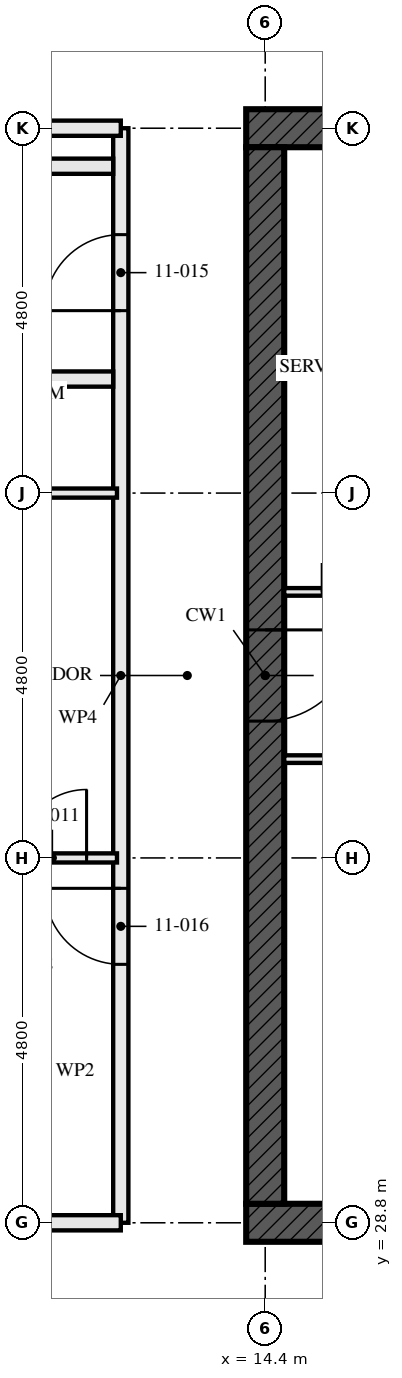
"""IFC4 building model, lengths in metres.
Left out: names, types, materials, properties, quantities, classifications, styles, units other than length and angle.
Written with IfcOpenShell. Run it as: python <this file> out.ifc"""

import sys

from ifc_helpers import new_model, si_unit, direction, frame, frame_2d, origin, place, context, subcontext, project, spatial, rectangle, extrude, element, fill, save


model = new_model("IFC4")
c1 = context("Model", 3, precision=1e-05, world=origin(), true_north=direction((0.0, 1.0)))
c2 = subcontext(c1, "Body", "Model", "MODEL_VIEW")
j1 = project(units=[si_unit("LENGTHUNIT", "METRE"), si_unit("PLANEANGLEUNIT", "RADIAN")], contexts=[c1])
p1 = place(None, origin())
s1 = spatial("IfcSite", under=j1, at=p1, CompositionType="ELEMENT")
p2 = place(p1, origin())
s2 = spatial("IfcBuilding", under=s1, at=p2, CompositionType="ELEMENT")
p3 = place(p2, frame((0.0, 0.0, 44.5)))
s3 = spatial("IfcBuildingStorey", under=s2, at=p3, CompositionType="ELEMENT", Elevation=44.5)
p4 = place(p3, frame((14.15, 28.8, -0.17), z_axis=(0.0, 0.0, 1.0), x_axis=(1.0, 0.0, 0.0)))
e1 = element("IfcWall", 1, at=p4, inside=s3, PredefinedType="SHEAR", context=c2, shape_type="SweptSolid", body=[
    extrude(rectangle(XDim=14.9, YDim=0.5, at=frame_2d((7.45, 0.0))), origin(), (0.0, 0.0, 1.0), 3.5),
])
p5 = place(p4, frame((6.85, 0.0, 0.17)))
e2 = element("IfcOpeningElement", 2, at=p5, cuts=e1, PredefinedType="OPENING", context=c2, shape_type="SweptSolid", body=[
    extrude(rectangle(XDim=1.2, YDim=2.1, at=frame_2d((0.6, 1.05))), frame((0.0, 0.26, 0.0), z_axis=(0.0, -1.0, 0.0), x_axis=(1.0, 0.0, 0.0)), (0.0, 0.0, 1.0), 0.521),
])
p6 = place(p3, frame((29.05, 43.2, -0.17), z_axis=(0.0, 0.0, 1.0), x_axis=(-1.0, 0.0, 0.0)))
e3 = element("IfcWall", 3, at=p6, inside=s3, PredefinedType="SHEAR", context=c2, shape_type="SweptSolid", body=[
    extrude(rectangle(XDim=14.9, YDim=0.5, at=frame_2d((7.45, 0.0))), origin(), (0.0, 0.0, 1.0), 3.5),
])
p7 = place(p6, frame((6.85, 0.0, 0.17)))
e4 = element("IfcOpeningElement", 4, at=p7, cuts=e3, PredefinedType="OPENING", context=c2, shape_type="SweptSolid", body=[
    extrude(rectangle(XDim=1.2, YDim=2.1, at=frame_2d((0.6, 1.05))), frame((0.0, 0.26, 0.0), z_axis=(0.0, -1.0, 0.0), x_axis=(1.0, 0.0, 0.0)), (0.0, 0.0, 1.0), 0.521),
])
p8 = place(p3, frame((14.4, 42.95, -0.17), z_axis=(0.0, 0.0, 1.0), x_axis=(0.0, -1.0, 0.0)))
e5 = element("IfcWall", 5, at=p8, inside=s3, PredefinedType="SHEAR", context=c2, shape_type="SweptSolid", body=[
    extrude(rectangle(XDim=13.9, YDim=0.5, at=frame_2d((6.95, 0.0))), origin(), (0.0, 0.0, 1.0), 3.5),
])
p9 = place(p8, frame((6.35, 0.0, 0.17)))
e6 = element("IfcOpeningElement", 6, at=p9, cuts=e5, PredefinedType="OPENING", context=c2, shape_type="SweptSolid", body=[
    extrude(rectangle(XDim=1.2, YDim=2.1, at=frame_2d((0.6, 1.05))), frame((0.0, 0.26, 0.0), z_axis=(0.0, -1.0, 0.0), x_axis=(1.0, 0.0, 0.0)), (0.0, 0.0, 1.0), 0.521),
])
for number, where, z_axis, x_axis in (
    (7, (7.7, 42.7, 0.0), (0.0, 0.0, 1.0), (1.0, 0.0, 0.0)),
    (8, (7.7, 39.9, 0.0), (0.0, 0.0, 1.0), (1.0, 0.0, 0.0)),
):
    element("IfcWall", number, at=place(p3, frame(where, z_axis=z_axis, x_axis=x_axis)), inside=s3, PredefinedType="SOLIDWALL", context=c2, shape_type="SweptSolid", body=[
        extrude(rectangle(XDim=4.7, YDim=0.2, at=frame_2d((2.35, 0.0))), origin(), (0.0, 0.0, 1.0), 2.99),
    ])
p10 = place(p3, frame((7.8, 38.4, 0.0), z_axis=(0.0, 0.0, 1.0), x_axis=(1.0, 0.0, 0.0)))
e9 = element("IfcWall", 9, at=p10, inside=s3, PredefinedType="PARTITIONING", context=c2, shape_type="SweptSolid", body=[
    extrude(rectangle(XDim=4.65, YDim=0.12, at=frame_2d((2.325, 0.0))), origin(), (0.0, 0.0, 1.0), 2.55),
])
p11 = place(p10, frame((1.875, 0.0, 0.0)))
e10 = element("IfcOpeningElement", 10, at=p11, cuts=e9, PredefinedType="OPENING", context=c2, shape_type="SweptSolid", body=[
    extrude(rectangle(XDim=0.9, YDim=2.1, at=frame_2d((0.45, 1.05))), frame((0.0, 0.071, 0.0), z_axis=(0.0, -1.0, 0.0), x_axis=(1.0, 0.0, 0.0)), (0.0, 0.0, 1.0), 0.141),
])
p12 = place(p3, frame((7.8, 33.6, 0.0), z_axis=(0.0, 0.0, 1.0), x_axis=(1.0, 0.0, 0.0)))
e11 = element("IfcWall", 11, at=p12, inside=s3, PredefinedType="PARTITIONING", context=c2, shape_type="SweptSolid", body=[
    extrude(rectangle(XDim=4.65, YDim=0.12, at=frame_2d((2.325, 0.0))), origin(), (0.0, 0.0, 1.0), 2.55),
])
p13 = place(p12, frame((3.35, 0.0, 0.0)))
e12 = element("IfcOpeningElement", 12, at=p13, cuts=e11, PredefinedType="OPENING", context=c2, shape_type="SweptSolid", body=[
    extrude(rectangle(XDim=0.9, YDim=2.1, at=frame_2d((0.45, 1.05))), frame((0.0, 0.071, 0.0), z_axis=(0.0, -1.0, 0.0), x_axis=(1.0, 0.0, 0.0)), (0.0, 0.0, 1.0), 0.141),
])
p14 = place(p3, frame((12.5, 43.2, 0.0), z_axis=(0.0, 0.0, 1.0), x_axis=(0.0, -1.0, 0.0)))
e13 = element("IfcWall", 13, at=p14, inside=s3, PredefinedType="PARTITIONING", context=c2, shape_type="SweptSolid", body=[
    extrude(rectangle(XDim=14.4, YDim=0.2, at=frame_2d((7.2, 0.0))), origin(), (0.0, 0.0, 1.0), 2.55),
])
p15 = place(p14, frame((1.4, 0.0, 0.0)))
e14 = element("IfcOpeningElement", 14, at=p15, cuts=e13, PredefinedType="OPENING", context=c2, shape_type="SweptSolid", body=[
    extrude(rectangle(XDim=1.0, YDim=2.1, at=frame_2d((0.5, 1.05))), frame((0.0, 0.111, 0.0), z_axis=(0.0, -1.0, 0.0), x_axis=(1.0, 0.0, 0.0)), (0.0, 0.0, 1.0), 0.221),
])
p16 = place(p14, frame((10.0, 0.0, 0.0)))
e15 = element("IfcOpeningElement", 15, at=p16, cuts=e13, PredefinedType="OPENING", context=c2, shape_type="SweptSolid", body=[
    extrude(rectangle(XDim=1.0, YDim=2.1, at=frame_2d((0.5, 1.05))), frame((0.0, 0.111, 0.0), z_axis=(0.0, -1.0, 0.0), x_axis=(1.0, 0.0, 0.0)), (0.0, 0.0, 1.0), 0.221),
])
p17 = place(p3, frame((14.65, 34.9, 0.0), z_axis=(0.0, 0.0, 1.0), x_axis=(1.0, 0.0, 0.0)))
e16 = element("IfcWall", 16, at=p17, inside=s3, PredefinedType="SOLIDWALL", context=c2, shape_type="SweptSolid", body=[
    extrude(rectangle(XDim=5.9, YDim=0.1, at=frame_2d((2.95, 0.0))), origin(), (0.0, 0.0, 1.0), 3.33),
])
p18 = place(p17, frame((1.6, 0.0, 0.0)))
e17 = element("IfcOpeningElement", 17, at=p18, cuts=e16, PredefinedType="OPENING", context=c2, shape_type="SweptSolid", body=[
    extrude(rectangle(XDim=0.7, YDim=2.1, at=frame_2d((0.35, 1.05))), frame((0.0, 0.061, 0.0), z_axis=(0.0, -1.0, 0.0), x_axis=(1.0, 0.0, 0.0)), (0.0, 0.0, 1.0), 0.121),
])
p19 = place(p3, frame((14.65, 37.1, 0.0), z_axis=(0.0, 0.0, 1.0), x_axis=(1.0, 0.0, 0.0)))
e18 = element("IfcWall", 18, at=p19, inside=s3, PredefinedType="SOLIDWALL", context=c2, shape_type="SweptSolid", body=[
    extrude(rectangle(XDim=5.9, YDim=0.1, at=frame_2d((2.95, 0.0))), origin(), (0.0, 0.0, 1.0), 3.33),
])
p20 = place(p19, frame((0.5, 0.0, 0.0)))
e19 = element("IfcOpeningElement", 19, at=p20, cuts=e18, PredefinedType="OPENING", context=c2, shape_type="SweptSolid", body=[
    extrude(rectangle(XDim=0.7, YDim=2.1, at=frame_2d((0.35, 1.05))), frame((0.0, 0.061, 0.0), z_axis=(0.0, -1.0, 0.0), x_axis=(1.0, 0.0, 0.0)), (0.0, 0.0, 1.0), 0.121),
])
p21 = place(p19, frame((1.85, 0.0, 0.0)))
e20 = element("IfcOpeningElement", 20, at=p21, cuts=e18, PredefinedType="OPENING", context=c2, shape_type="SweptSolid", body=[
    extrude(rectangle(XDim=0.9, YDim=2.1, at=frame_2d((0.45, 1.05))), frame((0.0, 0.061, 0.0), z_axis=(0.0, -1.0, 0.0), x_axis=(1.0, 0.0, 0.0)), (0.0, 0.0, 1.0), 0.121),
])
for number, where, z_axis, x_axis in (
    (21, (12.5, 28.8, 0.0), (0.0, 0.0, 1.0), (-1.0, 0.0, 0.0)),
    (22, (12.5, 43.2, 0.0), (0.0, 0.0, 1.0), (-1.0, 0.0, 0.0)),
):
    element("IfcWall", number, at=place(p3, frame(where, z_axis=z_axis, x_axis=x_axis)), inside=s3, PredefinedType="PARTITIONING", context=c2, shape_type="SweptSolid", body=[
        extrude(rectangle(XDim=2.505, YDim=0.2, at=frame_2d((1.252, 0.0))), origin(), (0.0, 0.0, 1.0), 2.32),
    ])
p22 = place(p13, origin())
e23 = element("IfcDoor", 23, at=p22, inside=s3, OperationType="SINGLE_SWING_LEFT", PredefinedType="DOOR", context=c2, shape_type="SweptSolid", body=[
    extrude(rectangle(XDim=0.9, YDim=2.1, at=frame_2d((0.45, 1.05))), frame((0.0, 0.022, 0.0), z_axis=(0.0, -1.0, 0.0), x_axis=(1.0, 0.0, 0.0)), (0.0, 0.0, 1.0), 0.044),
])
fill(e12, e23)
p23 = place(p15, frame((1.0, 0.0, 0.0), z_axis=(0.0, 0.0, 1.0), x_axis=(-1.0, 0.0, 0.0)))
e24 = element("IfcDoor", 24, at=p23, inside=s3, OperationType="SINGLE_SWING_RIGHT", PredefinedType="DOOR", context=c2, shape_type="SweptSolid", body=[
    extrude(rectangle(XDim=1.0, YDim=2.1, at=frame_2d((0.5, 1.05))), frame((0.0, 0.032, 0.0), z_axis=(0.0, -1.0, 0.0), x_axis=(1.0, 0.0, 0.0)), (0.0, 0.0, 1.0), 0.064),
])
fill(e14, e24)
p24 = place(p16, frame((1.0, 0.0, 0.0), z_axis=(0.0, 0.0, 1.0), x_axis=(-1.0, 0.0, 0.0)))
e25 = element("IfcDoor", 25, at=p24, inside=s3, OperationType="SINGLE_SWING_LEFT", PredefinedType="DOOR", context=c2, shape_type="SweptSolid", body=[
    extrude(rectangle(XDim=1.0, YDim=2.1, at=frame_2d((0.5, 1.05))), frame((0.0, 0.027, 0.0), z_axis=(0.0, -1.0, 0.0), x_axis=(1.0, 0.0, 0.0)), (0.0, 0.0, 1.0), 0.054),
])
fill(e15, e25)
p25 = place(p9, origin())
e26 = element("IfcDoor", 26, at=p25, inside=s3, OperationType="SINGLE_SWING_LEFT", PredefinedType="DOOR", context=c2, shape_type="SweptSolid", body=[
    extrude(rectangle(XDim=1.2, YDim=2.1, at=frame_2d((0.6, 1.05))), frame((0.0, 0.027, 0.0), z_axis=(0.0, -1.0, 0.0), x_axis=(1.0, 0.0, 0.0)), (0.0, 0.0, 1.0), 0.054),
])
fill(e6, e26)
save(model, sys.argv[1])
